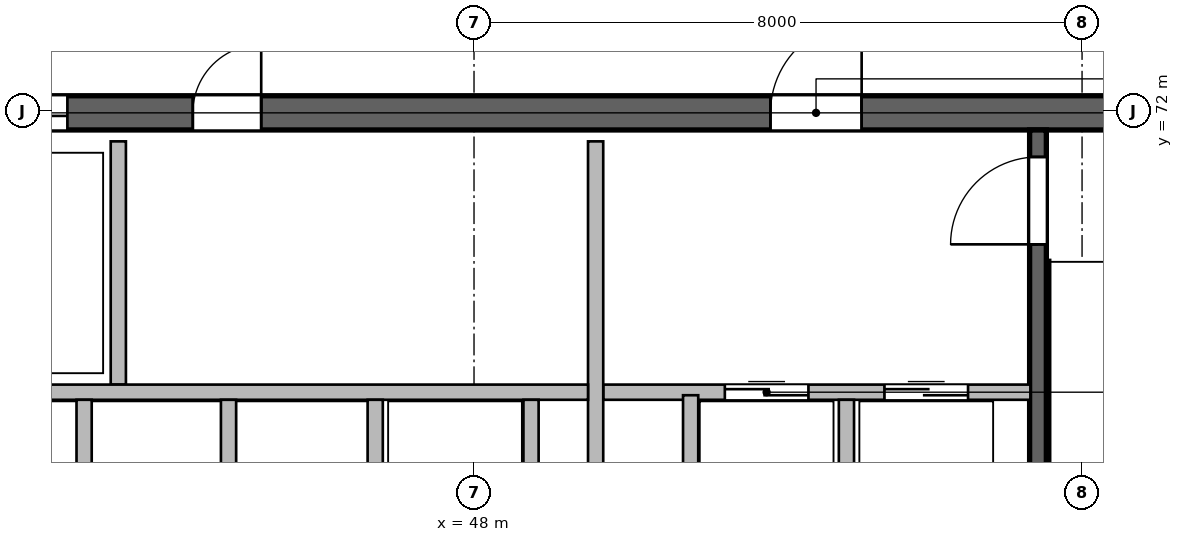
"""IFC4 building model, lengths in metres.
Left out: names, types, materials, properties, quantities, classifications, styles, units other than length and angle.
Written with IfcOpenShell. Run it as: python <this file> out.ifc"""

import sys

from ifc_helpers import new_model, si_unit, direction, frame, frame_2d, origin, place, context, subcontext, project, spatial, rectangle, extrude, source, transform, mapped, element, fill, save


model = new_model("IFC4")
c1 = context("Model", 3, precision=1e-05, world=origin(), true_north=direction((0.0, 1.0)))
c2 = subcontext(c1, "Body", "Model", "MODEL_VIEW")
j1 = project(units=[si_unit("LENGTHUNIT", "METRE"), si_unit("PLANEANGLEUNIT", "RADIAN")], contexts=[c1])
p1 = place(None, origin())
s1 = spatial("IfcSite", under=j1, at=p1, CompositionType="ELEMENT")
p2 = place(p1, origin())
s2 = spatial("IfcBuilding", under=s1, at=p2, CompositionType="ELEMENT")
p3 = place(p2, frame((0.0, 0.0, 189.6)))
s3 = spatial("IfcBuildingStorey", under=s2, at=p3, CompositionType="ELEMENT", Elevation=189.6)
m1 = source(origin(), c2, "Body", "SweptSolid", [
    extrude(rectangle(XDim=21.6, YDim=0.45, at=frame_2d((10.8, 0.0))), origin(), (0.0, 0.0, 1.0), 4.8),
])
p4 = place(p3, frame((37.2, 71.975, 0.0), z_axis=(0.0, 0.0, 1.0), x_axis=(1.0, 0.0, 0.0)))
e1 = element("IfcWall", 1, at=p4, inside=s3, PredefinedType="SHEAR", context=c2, shape_type="MappedRepresentation", body=[
    mapped(m1, transform((0.0, 0.0, 0.0), scale=1.0)),
])
p5 = place(p4, frame((1.2, 0.0, 0.0)))
e2 = element("IfcOpeningElement", 2, at=p5, cuts=e1, PredefinedType="OPENING", context=c2, shape_type="SweptSolid", body=[
    extrude(rectangle(XDim=0.9, YDim=2.1, at=frame_2d((0.45, 1.05))), frame((0.0, 0.235, 0.0), z_axis=(0.0, -1.0, 0.0), x_axis=(1.0, 0.0, 0.0)), (0.0, 0.0, 1.0), 0.47),
])
p6 = place(p4, frame((14.7, 0.0, 0.0)))
e3 = element("IfcOpeningElement", 3, at=p6, cuts=e1, PredefinedType="OPENING", context=c2, shape_type="SweptSolid", body=[
    extrude(rectangle(XDim=1.2, YDim=2.15, at=frame_2d((0.6, 1.075))), frame((0.0, 0.235, 0.0), z_axis=(0.0, -1.0, 0.0), x_axis=(1.0, 0.0, 0.0)), (0.0, 0.0, 1.0), 0.47),
])
p7 = place(p4, frame((4.15, 0.0, 0.0)))
e4 = element("IfcOpeningElement", 4, at=p7, cuts=e1, PredefinedType="OPENING", context=c2, shape_type="SweptSolid", body=[
    extrude(rectangle(XDim=1.3, YDim=2.15, at=frame_2d((0.65, 1.075))), frame((0.0, 0.235, 0.0), z_axis=(0.0, -1.0, 0.0), x_axis=(1.0, 0.0, 0.0)), (0.0, 0.0, 1.0), 0.47),
])
p8 = place(p4, frame((7.1, 0.0, 0.0)))
e5 = element("IfcOpeningElement", 5, at=p8, cuts=e1, PredefinedType="OPENING", context=c2, shape_type="SweptSolid", body=[
    extrude(rectangle(XDim=0.9, YDim=2.1, at=frame_2d((0.45, 1.05))), frame((0.0, 0.235, 0.0), z_axis=(0.0, -1.0, 0.0), x_axis=(1.0, 0.0, 0.0)), (0.0, 0.0, 1.0), 0.47),
])
m2 = source(origin(), c2, "Body", "SweptSolid", [
    extrude(rectangle(XDim=11.1, YDim=0.22, at=frame_2d((5.55, 0.0))), origin(), (0.0, 0.0, 1.0), 4.8),
])
p9 = place(p3, frame((55.42, 60.65, 0.0), z_axis=(0.0, 0.0, 1.0), x_axis=(0.0, 1.0, 0.0)))
e6 = element("IfcWall", 6, at=p9, inside=s3, PredefinedType="SHEAR", context=c2, shape_type="MappedRepresentation", body=[
    mapped(m2, transform((0.0, 0.0, 0.0), scale=1.0)),
])
p10 = place(p9, frame((9.595, 0.0, 0.0)))
e7 = element("IfcOpeningElement", 7, at=p10, cuts=e6, PredefinedType="OPENING", context=c2, shape_type="SweptSolid", body=[
    extrude(rectangle(XDim=1.15, YDim=2.15, at=frame_2d((0.575, 1.075))), frame((0.0, 0.12, 0.0), z_axis=(0.0, -1.0, 0.0), x_axis=(1.0, 0.0, 0.0)), (0.0, 0.0, 1.0), 0.24),
])
m3 = source(origin(), c2, "Body", "SweptSolid", [
    extrude(rectangle(XDim=5.62, YDim=0.2, at=frame_2d((2.81, 0.0))), origin(), (0.0, 0.0, 1.0), 4.48),
])
p11 = place(p3, frame((49.7, 68.3, 0.0), z_axis=(0.0, 0.0, 1.0), x_axis=(1.0, 0.0, 0.0)))
e8 = element("IfcWall", 8, at=p11, inside=s3, PredefinedType="SOLIDWALL", context=c2, shape_type="MappedRepresentation", body=[
    mapped(m3, transform((0.0, 0.0, 0.0), scale=1.0)),
])
p12 = place(p11, frame((1.6, 0.0, 0.0)))
e9 = element("IfcOpeningElement", 9, at=p12, cuts=e8, PredefinedType="OPENING", context=c2, shape_type="SweptSolid", body=[
    extrude(rectangle(XDim=1.1, YDim=2.15, at=frame_2d((0.55, 1.075))), frame((0.0, 0.11, 0.0), z_axis=(0.0, -1.0, 0.0), x_axis=(1.0, 0.0, 0.0)), (0.0, 0.0, 1.0), 0.22),
])
p13 = place(p11, frame((3.7, 0.0, 0.0)))
e10 = element("IfcOpeningElement", 10, at=p13, cuts=e8, PredefinedType="OPENING", context=c2, shape_type="SweptSolid", body=[
    extrude(rectangle(XDim=1.1, YDim=2.15, at=frame_2d((0.55, 1.075))), frame((0.0, 0.11, 0.0), z_axis=(0.0, -1.0, 0.0), x_axis=(1.0, 0.0, 0.0)), (0.0, 0.0, 1.0), 0.22),
])
m4 = source(origin(), c2, "Body", "SweptSolid", [
    extrude(rectangle(XDim=5.8, YDim=0.2, at=frame_2d((2.9, 0.0))), origin(), (0.0, 0.0, 1.0), 4.48),
])
p14 = place(p3, frame((49.6, 65.8, 0.0), z_axis=(0.0, 0.0, 1.0), x_axis=(0.0, 1.0, 0.0)))
e11 = element("IfcWall", 11, at=p14, inside=s3, PredefinedType="SOLIDWALL", context=c2, shape_type="MappedRepresentation", body=[
    mapped(m4, transform((0.0, 0.0, 0.0), scale=1.0)),
])
m5 = source(origin(), c2, "Body", "SweptSolid", [
    extrude(rectangle(XDim=2.58, YDim=0.2, at=frame_2d((1.29, 0.0))), origin(), (0.0, 0.0, 1.0), 4.48),
])
p15 = place(p3, frame((50.85, 65.68, 0.0), z_axis=(0.0, 0.0, 1.0), x_axis=(0.0, 1.0, 0.0)))
e12 = element("IfcWall", 12, at=p15, inside=s3, PredefinedType="SOLIDWALL", context=c2, shape_type="MappedRepresentation", body=[
    mapped(m5, transform((0.0, 0.0, 0.0), scale=1.0)),
])
m6 = source(origin(), c2, "Body", "SweptSolid", [
    extrude(rectangle(XDim=2.4, YDim=0.2, at=frame_2d((1.2, 0.0))), origin(), (0.0, 0.0, 1.0), 4.48),
])
p16 = place(p3, frame((52.9, 65.8, 0.0), z_axis=(0.0, 0.0, 1.0), x_axis=(0.0, 1.0, 0.0)))
e13 = element("IfcWall", 13, at=p16, inside=s3, PredefinedType="SOLIDWALL", context=c2, shape_type="MappedRepresentation", body=[
    mapped(m6, transform((0.0, 0.0, 0.0), scale=1.0)),
])
m7 = source(origin(), c2, "Body", "SweptSolid", [
    extrude(rectangle(XDim=3.2, YDim=0.2, at=frame_2d((1.6, 0.0))), origin(), (0.0, 0.0, 1.0), 4.48),
])
p17 = place(p3, frame((43.32, 68.4, 0.0), z_axis=(0.0, 0.0, 1.0), x_axis=(0.0, 1.0, 0.0)))
e14 = element("IfcWall", 14, at=p17, inside=s3, PredefinedType="SOLIDWALL", context=c2, shape_type="MappedRepresentation", body=[
    mapped(m7, transform((0.0, 0.0, 0.0), scale=1.0)),
])
m8 = source(origin(), c2, "Body", "SweptSolid", [
    extrude(rectangle(XDim=8.8, YDim=0.2, at=frame_2d((4.4, 0.0))), origin(), (0.0, 0.0, 1.0), 4.48),
])
p18 = place(p3, frame((40.7, 68.3, 0.0), z_axis=(0.0, 0.0, 1.0), x_axis=(1.0, 0.0, 0.0)))
e15 = element("IfcWall", 15, at=p18, inside=s3, PredefinedType="SOLIDWALL", context=c2, shape_type="MappedRepresentation", body=[
    mapped(m8, transform((0.0, 0.0, 0.0), scale=1.0)),
])
for number, where, z_axis, x_axis in (
    (16, (48.75, 65.8, 0.0), (0.0, 0.0, 1.0), (0.0, 1.0, 0.0)),
    (17, (42.87, 65.8, 0.0), (0.0, 0.0, 1.0), (0.0, 1.0, 0.0)),
    (18, (44.77, 65.8, 0.0), (0.0, 0.0, 1.0), (0.0, 1.0, 0.0)),
    (19, (46.7, 65.8, 0.0), (0.0, 0.0, 1.0), (0.0, 1.0, 0.0)),
):
    element("IfcWall", number, at=place(p3, frame(where, z_axis=z_axis, x_axis=x_axis)), inside=s3, PredefinedType="SOLIDWALL", context=c2, shape_type="MappedRepresentation", body=[
        mapped(m6, transform((0.0, 0.0, 0.0), scale=1.0)),
    ])
m9 = source(origin(), c2, "Body", "SweptSolid", [
    extrude(rectangle(XDim=1.15, YDim=2.15, at=frame_2d((0.575, 1.075))), frame((0.0, 0.025, 0.0), z_axis=(0.0, -1.0, 0.0), x_axis=(1.0, 0.0, 0.0)), (0.0, 0.0, 1.0), 0.05),
])
p19 = place(p10, origin())
e20 = element("IfcDoor", 20, at=p19, inside=s3, OperationType="SINGLE_SWING_LEFT", PredefinedType="DOOR", context=c2, shape_type="MappedRepresentation", body=[
    mapped(m9, transform((0.0, 0.0, 0.0), scale=1.0)),
])
fill(e7, e20)
m10 = source(origin(), c2, "Body", "SweptSolid", [
    extrude(rectangle(XDim=1.2, YDim=2.15, at=frame_2d((0.6, 1.075))), frame((0.0, 0.025, 0.0), z_axis=(0.0, -1.0, 0.0), x_axis=(1.0, 0.0, 0.0)), (0.0, 0.0, 1.0), 0.05),
])
p20 = place(p6, origin())
e21 = element("IfcDoor", 21, at=p20, inside=s3, OperationType="SINGLE_SWING_RIGHT", PredefinedType="DOOR", context=c2, shape_type="MappedRepresentation", body=[
    mapped(m10, transform((0.0, 0.0, 0.0), scale=1.0)),
])
fill(e3, e21)
m11 = source(origin(), c2, "Body", "SweptSolid", [
    extrude(rectangle(XDim=1.1, YDim=2.15, at=frame_2d((0.55, 1.075))), frame((0.0, 0.025, 0.0), z_axis=(0.0, -1.0, 0.0), x_axis=(1.0, 0.0, 0.0)), (0.0, 0.0, 1.0), 0.05),
])
p21 = place(p12, origin())
e22 = element("IfcDoor", 22, at=p21, inside=s3, OperationType="DOUBLE_DOOR_SLIDING", PredefinedType="DOOR", context=c2, shape_type="MappedRepresentation", body=[
    mapped(m11, transform((0.0, 0.0, 0.0), scale=1.0)),
])
fill(e9, e22)
p22 = place(p13, origin())
e23 = element("IfcDoor", 23, at=p22, inside=s3, OperationType="DOUBLE_DOOR_SLIDING", PredefinedType="DOOR", context=c2, shape_type="MappedRepresentation", body=[
    mapped(m11, transform((0.0, 0.0, 0.0), scale=1.0)),
])
fill(e10, e23)
m12 = source(origin(), c2, "Body", "SweptSolid", [
    extrude(rectangle(XDim=1.3, YDim=2.15, at=frame_2d((0.65, 1.075))), frame((0.0, 0.025, 0.0), z_axis=(0.0, -1.0, 0.0), x_axis=(1.0, 0.0, 0.0)), (0.0, 0.0, 1.0), 0.05),
])
p23 = place(p7, origin())
e24 = element("IfcDoor", 24, at=p23, inside=s3, OperationType="DOUBLE_DOOR_SLIDING", PredefinedType="DOOR", context=c2, shape_type="MappedRepresentation", body=[
    mapped(m12, transform((0.0, 0.0, 0.0), scale=1.0)),
])
fill(e4, e24)
m13 = source(origin(), c2, "Body", "SweptSolid", [
    extrude(rectangle(XDim=0.9, YDim=2.1, at=frame_2d((0.45, 1.05))), frame((0.0, 0.025, 0.0), z_axis=(0.0, -1.0, 0.0), x_axis=(1.0, 0.0, 0.0)), (0.0, 0.0, 1.0), 0.05),
])
p24 = place(p8, origin())
e25 = element("IfcDoor", 25, at=p24, inside=s3, OperationType="SINGLE_SWING_RIGHT", PredefinedType="DOOR", context=c2, shape_type="MappedRepresentation", body=[
    mapped(m13, transform((0.0, 0.0, 0.0), scale=1.0)),
])
fill(e5, e25)
save(model, sys.argv[1])
